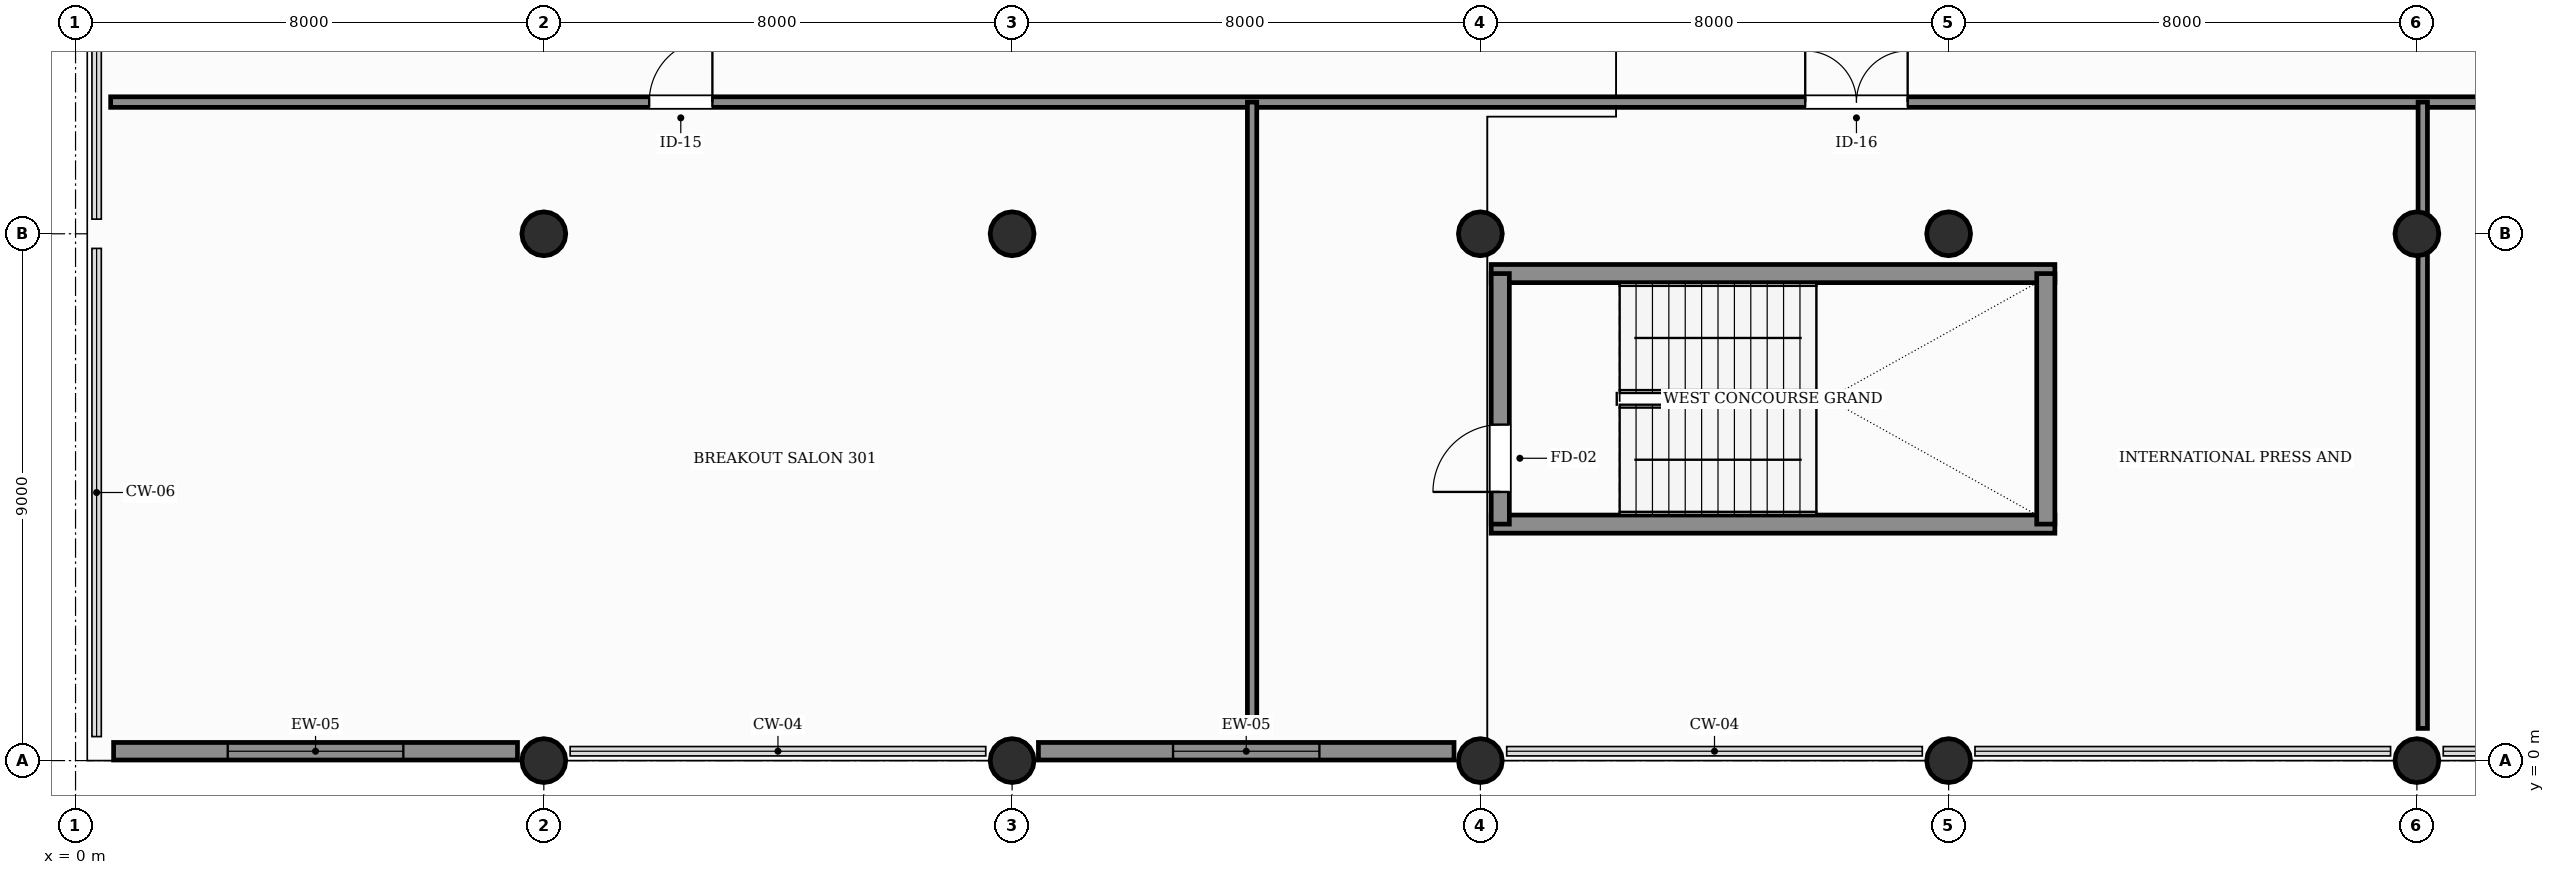
"""IFC4 building model, lengths in metres.
Left out: names, types, materials, properties, quantities, classifications, styles, units other than length and angle.
Written with IfcOpenShell. Run it as: python <this file> out.ifc"""

import sys

from ifc_helpers import new_model, si_unit, direction, frame, frame_2d, origin, origin_2d, place, context, subcontext, project, spatial, rectangle, circle, extrude, element, fill, save


model = new_model("IFC4")
c1 = context("Model", 3, precision=1e-05, world=origin(), true_north=direction((0.0, 1.0)))
c2 = subcontext(c1, "Body", "Model", "MODEL_VIEW")
j1 = project(units=[si_unit("LENGTHUNIT", "METRE"), si_unit("PLANEANGLEUNIT", "RADIAN")], contexts=[c1])
p1 = place(None, origin())
s1 = spatial("IfcSite", under=j1, at=p1, CompositionType="ELEMENT")
p2 = place(p1, origin())
s2 = spatial("IfcBuilding", under=s1, at=p2, CompositionType="ELEMENT")
p3 = place(p2, frame((0.0, 0.0, 16.2)))
s3 = spatial("IfcBuildingStorey", under=s2, at=p3, CompositionType="ELEMENT", Elevation=16.2)
for number, where, z_axis, x_axis in (
    (1, (8.0, 0.0, 0.0), (0.0, 0.0, 1.0), (1.0, 0.0, 0.0)),
    (2, (8.0, 9.0, 0.0), (0.0, 0.0, 1.0), (1.0, 0.0, 0.0)),
    (3, (16.0, 0.0, 0.0), (0.0, 0.0, 1.0), (1.0, 0.0, 0.0)),
    (4, (16.0, 9.0, 0.0), (0.0, 0.0, 1.0), (1.0, 0.0, 0.0)),
    (5, (24.0, 0.0, 0.0), (0.0, 0.0, 1.0), (1.0, 0.0, 0.0)),
    (6, (24.0, 9.0, 0.0), (0.0, 0.0, 1.0), (1.0, 0.0, 0.0)),
    (7, (32.0, 0.0, 0.0), (0.0, 0.0, 1.0), (1.0, 0.0, 0.0)),
    (8, (32.0, 9.0, 0.0), (0.0, 0.0, 1.0), (1.0, 0.0, 0.0)),
    (9, (40.0, 0.0, 0.0), (0.0, 0.0, 1.0), (1.0, 0.0, 0.0)),
    (10, (40.0, 9.0, 0.0), (0.0, 0.0, 1.0), (1.0, 0.0, 0.0)),
):
    element("IfcColumn", number, at=place(p3, frame(where, z_axis=z_axis, x_axis=x_axis)), inside=s3, PredefinedType="COLUMN", context=c2, shape_type="SweptSolid", body=[
        extrude(circle(Radius=0.375, at=origin_2d()), origin(), (0.0, 0.0, 1.0), 4.8),
    ])
p4 = place(p3, frame((0.65, 0.16, 0.0), z_axis=(0.0, 0.0, 1.0), x_axis=(1.0, 0.0, 0.0)))
e11 = element("IfcWall", 11, at=p4, inside=s3, PredefinedType="SOLIDWALL", context=c2, shape_type="SweptSolid", body=[
    extrude(rectangle(XDim=6.9, YDim=0.3, at=frame_2d((3.45, 0.0))), origin(), (0.0, 0.0, 1.0), 3.6),
])
p5 = place(p4, frame((1.95, 0.0, 0.9)))
e12 = element("IfcOpeningElement", 12, at=p5, cuts=e11, PredefinedType="OPENING", context=c2, shape_type="SweptSolid", body=[
    extrude(rectangle(XDim=3.0, YDim=1.75, at=frame_2d((1.5, 0.875))), frame((0.0, 0.16, 0.0), z_axis=(0.0, -1.0, 0.0), x_axis=(1.0, 0.0, 0.0)), (0.0, 0.0, 1.0), 0.32),
])
p6 = place(p3, frame((16.45, 0.16, 0.0), z_axis=(0.0, 0.0, 1.0), x_axis=(1.0, 0.0, 0.0)))
e13 = element("IfcWall", 13, at=p6, inside=s3, PredefinedType="SOLIDWALL", context=c2, shape_type="SweptSolid", body=[
    extrude(rectangle(XDim=7.1, YDim=0.3, at=frame_2d((3.55, 0.0))), origin(), (0.0, 0.0, 1.0), 3.6),
])
p7 = place(p6, frame((2.3, 0.0, 0.9)))
e14 = element("IfcOpeningElement", 14, at=p7, cuts=e13, PredefinedType="OPENING", context=c2, shape_type="SweptSolid", body=[
    extrude(rectangle(XDim=2.5, YDim=1.6, at=frame_2d((1.25, 0.8))), frame((0.0, 0.16, 0.0), z_axis=(0.0, -1.0, 0.0), x_axis=(1.0, 0.0, 0.0)), (0.0, 0.0, 1.0), 0.32),
])
for number, where, z_axis, x_axis in (
    (15, (24.185, 4.04, 0.0), (0.0, 0.0, 1.0), (1.0, 0.0, 0.0)),
    (16, (24.185, 8.32, 0.0), (0.0, 0.0, 1.0), (1.0, 0.0, 0.0)),
):
    element("IfcWall", number, at=place(p3, frame(where, z_axis=z_axis, x_axis=x_axis)), inside=s3, PredefinedType="SHEAR", context=c2, shape_type="SweptSolid", body=[
        extrude(rectangle(XDim=9.63, YDim=0.31, at=frame_2d((4.815, 0.0))), origin(), (0.0, 0.0, 1.0), 4.8),
    ])
p8 = place(p3, frame((24.34, 4.04, 0.0), z_axis=(0.0, 0.0, 1.0), x_axis=(0.0, 1.0, 0.0)))
e17 = element("IfcWall", 17, at=p8, inside=s3, PredefinedType="SHEAR", context=c2, shape_type="SweptSolid", body=[
    extrude(rectangle(XDim=4.28, YDim=0.31, at=frame_2d((2.14, 0.0))), origin(), (0.0, 0.0, 1.0), 4.8),
])
p9 = place(p8, frame((0.55, 0.0, 0.0)))
e18 = element("IfcOpeningElement", 18, at=p9, cuts=e17, PredefinedType="OPENING", context=c2, shape_type="SweptSolid", body=[
    extrude(rectangle(XDim=1.15, YDim=2.2, at=frame_2d((0.575, 1.1))), frame((0.0, 0.165, 0.0), z_axis=(0.0, -1.0, 0.0), x_axis=(1.0, 0.0, 0.0)), (0.0, 0.0, 1.0), 0.33),
])
p10 = place(p3, frame((33.66, 4.04, 0.0), z_axis=(0.0, 0.0, 1.0), x_axis=(0.0, 1.0, 0.0)))
e19 = element("IfcWall", 19, at=p10, inside=s3, PredefinedType="SHEAR", context=c2, shape_type="SweptSolid", body=[
    extrude(rectangle(XDim=4.28, YDim=0.31, at=frame_2d((2.14, 0.0))), origin(), (0.0, 0.0, 1.0), 4.8),
])
p11 = place(p3, frame((0.6, 11.25, 0.0), z_axis=(0.0, 0.0, 1.0), x_axis=(1.0, 0.0, 0.0)))
e20 = element("IfcWall", 20, at=p11, inside=s3, PredefinedType="PARTITIONING", context=c2, shape_type="SweptSolid", body=[
    extrude(rectangle(XDim=118.8, YDim=0.18, at=frame_2d((59.4, 0.0))), origin(), (0.0, 0.0, 1.0), 3.55),
])
p12 = place(p11, frame((9.2, 0.0, 0.0)))
e21 = element("IfcOpeningElement", 21, at=p12, cuts=e20, PredefinedType="OPENING", context=c2, shape_type="SweptSolid", body=[
    extrude(rectangle(XDim=1.08, YDim=2.3, at=frame_2d((0.54, 1.15))), frame((0.0, 0.1, 0.0), z_axis=(0.0, -1.0, 0.0), x_axis=(1.0, 0.0, 0.0)), (0.0, 0.0, 1.0), 0.2),
])
p13 = place(p11, frame((28.95, 0.0, 0.0)))
e22 = element("IfcOpeningElement", 22, at=p13, cuts=e20, PredefinedType="OPENING", context=c2, shape_type="SweptSolid", body=[
    extrude(rectangle(XDim=1.75, YDim=2.35, at=frame_2d((0.875, 1.175))), frame((0.0, 0.1, 0.0), z_axis=(0.0, -1.0, 0.0), x_axis=(1.0, 0.0, 0.0)), (0.0, 0.0, 1.0), 0.2),
])
p14 = place(p11, frame((50.95, 0.0, 0.0)))
e23 = element("IfcOpeningElement", 23, at=p14, cuts=e20, PredefinedType="OPENING", context=c2, shape_type="SweptSolid", body=[
    extrude(rectangle(XDim=1.08, YDim=2.3, at=frame_2d((0.54, 1.15))), frame((0.0, 0.1, 0.0), z_axis=(0.0, -1.0, 0.0), x_axis=(1.0, 0.0, 0.0)), (0.0, 0.0, 1.0), 0.2),
])
p15 = place(p11, frame((74.95, 0.0, 0.0)))
e24 = element("IfcOpeningElement", 24, at=p15, cuts=e20, PredefinedType="OPENING", context=c2, shape_type="SweptSolid", body=[
    extrude(rectangle(XDim=1.75, YDim=2.35, at=frame_2d((0.875, 1.175))), frame((0.0, 0.1, 0.0), z_axis=(0.0, -1.0, 0.0), x_axis=(1.0, 0.0, 0.0)), (0.0, 0.0, 1.0), 0.2),
])
p16 = place(p11, frame((95.95, 0.0, 0.0)))
e25 = element("IfcOpeningElement", 25, at=p16, cuts=e20, PredefinedType="OPENING", context=c2, shape_type="SweptSolid", body=[
    extrude(rectangle(XDim=1.08, YDim=2.3, at=frame_2d((0.54, 1.15))), frame((0.0, 0.1, 0.0), z_axis=(0.0, -1.0, 0.0), x_axis=(1.0, 0.0, 0.0)), (0.0, 0.0, 1.0), 0.2),
])
p17 = place(p11, frame((111.6, 0.0, 0.0)))
e26 = element("IfcOpeningElement", 26, at=p17, cuts=e20, PredefinedType="OPENING", context=c2, shape_type="SweptSolid", body=[
    extrude(rectangle(XDim=1.75, YDim=2.35, at=frame_2d((0.875, 1.175))), frame((0.0, 0.1, 0.0), z_axis=(0.0, -1.0, 0.0), x_axis=(1.0, 0.0, 0.0)), (0.0, 0.0, 1.0), 0.2),
])
for number, where, z_axis, x_axis in (
    (27, (20.1, 0.55, 0.0), (0.0, 0.0, 1.0), (0.0, 1.0, 0.0)),
    (28, (40.1, 0.55, 0.0), (0.0, 0.0, 1.0), (0.0, 1.0, 0.0)),
):
    element("IfcWall", number, at=place(p3, frame(where, z_axis=z_axis, x_axis=x_axis)), inside=s3, PredefinedType="PARTITIONING", context=c2, shape_type="SweptSolid", body=[
        extrude(rectangle(XDim=10.7, YDim=0.16, at=frame_2d((5.35, 0.0))), origin(), (0.0, 0.0, 1.0), 3.55),
    ])
p18 = place(p5, origin())
e29 = element("IfcWindow", 29, at=p18, inside=s3, PartitioningType="SINGLE_PANEL", PredefinedType="WINDOW", context=c2, shape_type="SweptSolid", body=[
    extrude(rectangle(XDim=3.0, YDim=1.75, at=frame_2d((1.5, 0.875))), frame((0.0, 0.03, 0.0), z_axis=(0.0, -1.0, 0.0), x_axis=(1.0, 0.0, 0.0)), (0.0, 0.0, 1.0), 0.06),
])
fill(e12, e29)
p19 = place(p7, origin())
e30 = element("IfcWindow", 30, at=p19, inside=s3, PartitioningType="SINGLE_PANEL", PredefinedType="WINDOW", context=c2, shape_type="SweptSolid", body=[
    extrude(rectangle(XDim=2.5, YDim=1.6, at=frame_2d((1.25, 0.8))), frame((0.0, 0.03, 0.0), z_axis=(0.0, -1.0, 0.0), x_axis=(1.0, 0.0, 0.0)), (0.0, 0.0, 1.0), 0.06),
])
fill(e14, e30)
p20 = place(p9, origin())
e31 = element("IfcDoor", 31, at=p20, inside=s3, OperationType="SINGLE_SWING_LEFT", PredefinedType="DOOR", context=c2, shape_type="SweptSolid", body=[
    extrude(rectangle(XDim=1.15, YDim=2.2, at=frame_2d((0.575, 1.1))), frame((0.0, 0.025, 0.0), z_axis=(0.0, -1.0, 0.0), x_axis=(1.0, 0.0, 0.0)), (0.0, 0.0, 1.0), 0.05),
])
fill(e18, e31)
p21 = place(p12, origin())
e32 = element("IfcDoor", 32, at=p21, inside=s3, OperationType="SINGLE_SWING_RIGHT", PredefinedType="DOOR", context=c2, shape_type="SweptSolid", body=[
    extrude(rectangle(XDim=1.08, YDim=2.3, at=frame_2d((0.54, 1.15))), frame((0.0, 0.025, 0.0), z_axis=(0.0, -1.0, 0.0), x_axis=(1.0, 0.0, 0.0)), (0.0, 0.0, 1.0), 0.05),
])
fill(e21, e32)
p22 = place(p13, origin())
e33 = element("IfcDoor", 33, at=p22, inside=s3, OperationType="DOUBLE_DOOR_SINGLE_SWING", PredefinedType="DOOR", context=c2, shape_type="SweptSolid", body=[
    extrude(rectangle(XDim=1.75, YDim=2.35, at=frame_2d((0.875, 1.175))), frame((0.0, 0.025, 0.0), z_axis=(0.0, -1.0, 0.0), x_axis=(1.0, 0.0, 0.0)), (0.0, 0.0, 1.0), 0.05),
])
fill(e22, e33)
save(model, sys.argv[1])
